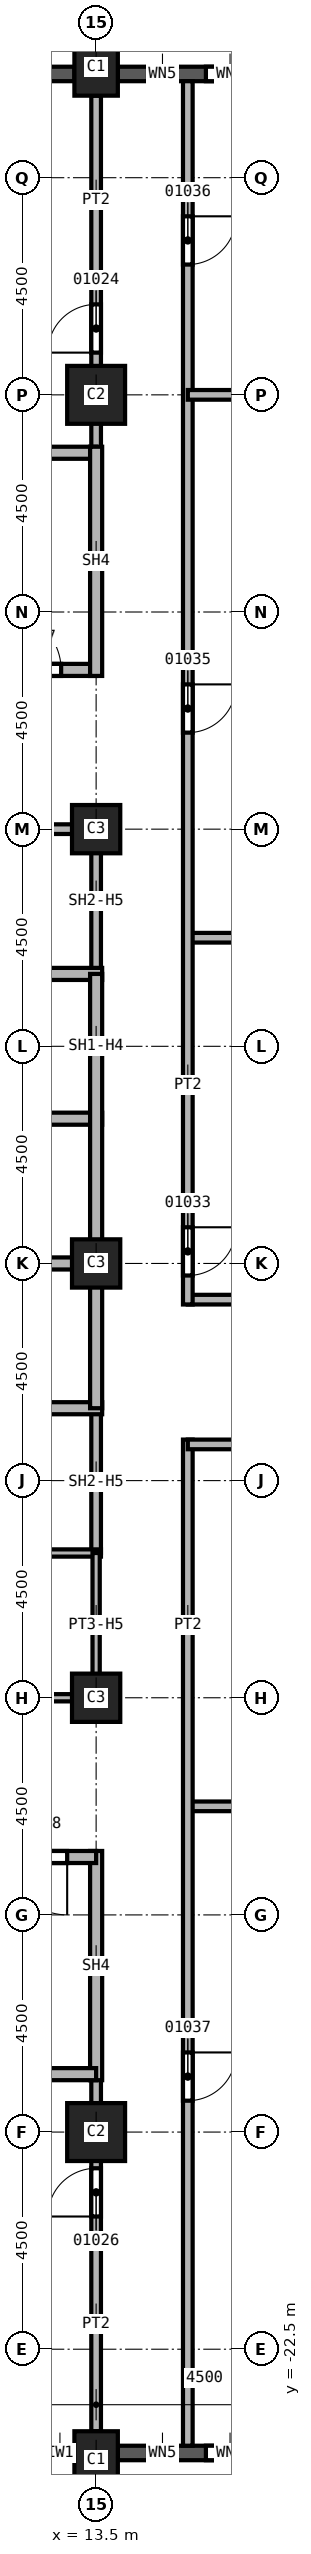
"""IFC4 building model, lengths in metres.
Left out: names, types, materials, properties, quantities, classifications, styles, units other than length and angle.
Written with IfcOpenShell. Run it as: python <this file> out.ifc"""

import sys

from ifc_helpers import new_model, si_unit, direction, frame, frame_2d, origin, origin_2d, place, context, subcontext, project, spatial, rectangle, extrude, element, fill, save


model = new_model("IFC4")
c1 = context("Model", 3, precision=1e-05, world=origin(), true_north=direction((0.0, 1.0)))
c2 = subcontext(c1, "Body", "Model", "MODEL_VIEW")
j1 = project(units=[si_unit("LENGTHUNIT", "METRE"), si_unit("PLANEANGLEUNIT", "RADIAN")], contexts=[c1])
p1 = place(None, origin())
s1 = spatial("IfcSite", under=j1, at=p1, CompositionType="ELEMENT")
p2 = place(p1, origin())
s2 = spatial("IfcBuilding", under=s1, at=p2, CompositionType="ELEMENT")
p3 = place(p2, frame((0.0, 0.0, 72.0)))
s3 = spatial("IfcBuildingStorey", under=s2, at=p3, CompositionType="ELEMENT", Elevation=72.0)
for number, where, z_axis, x_axis in (
    (1, (13.5, 18.0, 0.0), (0.0, 0.0, 1.0), (1.0, 0.0, 0.0)),
    (2, (13.5, -18.0, 0.0), (0.0, 0.0, 1.0), (1.0, 0.0, 0.0)),
):
    element("IfcColumn", number, at=place(p3, frame(where, z_axis=z_axis, x_axis=x_axis)), inside=s3, PredefinedType="COLUMN", context=c2, shape_type="SweptSolid", body=[
        extrude(rectangle(XDim=1.2, YDim=1.2, at=origin_2d()), origin(), (0.0, 0.0, 1.0), 3.7),
    ])
for number, where, z_axis, x_axis in (
    (3, (13.5, 0.0, 0.0), (0.0, 0.0, 1.0), (1.0, 0.0, 0.0)),
    (4, (13.5, 9.0, 0.0), (0.0, 0.0, 1.0), (1.0, 0.0, 0.0)),
    (5, (13.5, -9.0, 0.0), (0.0, 0.0, 1.0), (1.0, 0.0, 0.0)),
):
    element("IfcColumn", number, at=place(p3, frame(where, z_axis=z_axis, x_axis=x_axis)), inside=s3, PredefinedType="COLUMN", context=c2, shape_type="SweptSolid", body=[
        extrude(rectangle(XDim=1.0, YDim=1.0, at=origin_2d()), origin(), (0.0, 0.0, 1.0), 3.7),
    ])
for number, where, z_axis, x_axis in (
    (6, (13.5, 24.8, 0.0), (0.0, 0.0, 1.0), (1.0, 0.0, 0.0)),
    (7, (13.5, -24.8, 0.0), (0.0, 0.0, 1.0), (1.0, 0.0, 0.0)),
):
    element("IfcColumn", number, at=place(p3, frame(where, z_axis=z_axis, x_axis=x_axis)), inside=s3, PredefinedType="COLUMN", context=c2, shape_type="SweptSolid", body=[
        extrude(rectangle(XDim=0.9, YDim=1.2, at=origin_2d()), origin(), (0.0, 0.0, 1.0), 3.7),
    ])
p4 = place(p3, frame((9.45, -24.65, 0.0), z_axis=(0.0, 0.0, 1.0), x_axis=(1.0, 0.0, 0.0)))
e8 = element("IfcWall", 8, at=p4, inside=s3, PredefinedType="SOLIDWALL", context=c2, shape_type="SweptSolid", body=[
    extrude(rectangle(XDim=3.6, YDim=0.3, at=frame_2d((1.8, 0.0))), origin(), (0.0, 0.0, 1.0), 3.1),
])
p5 = place(p4, frame((0.6, 0.0, 0.8)))
e9 = element("IfcOpeningElement", 9, at=p5, cuts=e8, PredefinedType="OPENING", context=c2, shape_type="SweptSolid", body=[
    extrude(rectangle(XDim=2.4, YDim=1.95, at=frame_2d((1.2, 0.975))), frame((0.0, 0.15, 0.0), z_axis=(0.0, -1.0, 0.0), x_axis=(1.0, 0.0, 0.0)), (0.0, 0.0, 1.0), 0.3),
])
p6 = place(p3, frame((13.95, -24.65, 0.0), z_axis=(0.0, 0.0, 1.0), x_axis=(1.0, 0.0, 0.0)))
e10 = element("IfcWall", 10, at=p6, inside=s3, PredefinedType="SOLIDWALL", context=c2, shape_type="SweptSolid", body=[
    extrude(rectangle(XDim=3.6, YDim=0.3, at=frame_2d((1.8, 0.0))), origin(), (0.0, 0.0, 1.0), 3.1),
])
p7 = place(p6, frame((0.625, 0.0, 0.8)))
e11 = element("IfcOpeningElement", 11, at=p7, cuts=e10, PredefinedType="OPENING", context=c2, shape_type="SweptSolid", body=[
    extrude(rectangle(XDim=0.6, YDim=1.95, at=frame_2d((0.3, 0.975))), frame((0.0, 0.15, 0.0), z_axis=(0.0, -1.0, 0.0), x_axis=(1.0, 0.0, 0.0)), (0.0, 0.0, 1.0), 0.3),
])
p8 = place(p6, frame((1.825, 0.0, 0.8)))
e12 = element("IfcOpeningElement", 12, at=p8, cuts=e10, PredefinedType="OPENING", context=c2, shape_type="SweptSolid", body=[
    extrude(rectangle(XDim=1.0, YDim=1.95, at=frame_2d((0.5, 0.975))), frame((0.0, 0.15, 0.0), z_axis=(0.0, -1.0, 0.0), x_axis=(1.0, 0.0, 0.0)), (0.0, 0.0, 1.0), 0.3),
])
p9 = place(p3, frame((17.55, 24.65, 0.0), z_axis=(0.0, 0.0, 1.0), x_axis=(-1.0, 0.0, 0.0)))
e13 = element("IfcWall", 13, at=p9, inside=s3, PredefinedType="SOLIDWALL", context=c2, shape_type="SweptSolid", body=[
    extrude(rectangle(XDim=3.6, YDim=0.3, at=frame_2d((1.8, 0.0))), origin(), (0.0, 0.0, 1.0), 3.1),
])
p10 = place(p9, frame((0.775, 0.0, 0.8)))
e14 = element("IfcOpeningElement", 14, at=p10, cuts=e13, PredefinedType="OPENING", context=c2, shape_type="SweptSolid", body=[
    extrude(rectangle(XDim=1.0, YDim=1.95, at=frame_2d((0.5, 0.975))), frame((0.0, 0.15, 0.0), z_axis=(0.0, -1.0, 0.0), x_axis=(1.0, 0.0, 0.0)), (0.0, 0.0, 1.0), 0.3),
])
p11 = place(p9, frame((2.375, 0.0, 0.8)))
e15 = element("IfcOpeningElement", 15, at=p11, cuts=e13, PredefinedType="OPENING", context=c2, shape_type="SweptSolid", body=[
    extrude(rectangle(XDim=0.6, YDim=1.95, at=frame_2d((0.3, 0.975))), frame((0.0, 0.15, 0.0), z_axis=(0.0, -1.0, 0.0), x_axis=(1.0, 0.0, 0.0)), (0.0, 0.0, 1.0), 0.3),
])
p12 = place(p3, frame((13.05, 24.65, 0.0), z_axis=(0.0, 0.0, 1.0), x_axis=(-1.0, 0.0, 0.0)))
e16 = element("IfcWall", 16, at=p12, inside=s3, PredefinedType="SOLIDWALL", context=c2, shape_type="SweptSolid", body=[
    extrude(rectangle(XDim=3.6, YDim=0.3, at=frame_2d((1.8, 0.0))), origin(), (0.0, 0.0, 1.0), 3.1),
])
p13 = place(p12, frame((0.6, 0.0, 0.8)))
e17 = element("IfcOpeningElement", 17, at=p13, cuts=e16, PredefinedType="OPENING", context=c2, shape_type="SweptSolid", body=[
    extrude(rectangle(XDim=2.4, YDim=1.95, at=frame_2d((1.2, 0.975))), frame((0.0, 0.15, 0.0), z_axis=(0.0, -1.0, 0.0), x_axis=(1.0, 0.0, 0.0)), (0.0, 0.0, 1.0), 0.3),
])
p14 = place(p3, frame((13.5, -24.2, 0.0), z_axis=(0.0, 0.0, 1.0), x_axis=(0.0, 1.0, 0.0)))
e18 = element("IfcWall", 18, at=p14, inside=s3, PredefinedType="PARTITIONING", context=c2, shape_type="SweptSolid", body=[
    extrude(rectangle(XDim=7.525, YDim=0.2, at=frame_2d((3.762, 0.0))), origin(), (0.0, 0.0, 1.0), 3.7),
])
p15 = place(p14, frame((4.45, 0.0, 0.0)))
e19 = element("IfcOpeningElement", 19, at=p15, cuts=e18, PredefinedType="OPENING", context=c2, shape_type="SweptSolid", body=[
    extrude(rectangle(XDim=1.0, YDim=2.1, at=frame_2d((0.5, 1.05))), frame((0.0, 0.1, 0.0), z_axis=(0.0, -1.0, 0.0), x_axis=(1.0, 0.0, 0.0)), (0.0, 0.0, 1.0), 0.2),
])
p16 = place(p3, frame((13.5, 16.675, 0.0), z_axis=(0.0, 0.0, 1.0), x_axis=(0.0, 1.0, 0.0)))
e20 = element("IfcWall", 20, at=p16, inside=s3, PredefinedType="PARTITIONING", context=c2, shape_type="SweptSolid", body=[
    extrude(rectangle(XDim=7.525, YDim=0.2, at=frame_2d((3.762, 0.0))), origin(), (0.0, 0.0, 1.0), 3.7),
])
p17 = place(p16, frame((2.2, 0.0, 0.0)))
e21 = element("IfcOpeningElement", 21, at=p17, cuts=e20, PredefinedType="OPENING", context=c2, shape_type="SweptSolid", body=[
    extrude(rectangle(XDim=1.0, YDim=2.1, at=frame_2d((0.5, 1.05))), frame((0.0, 0.1, 0.0), z_axis=(0.0, -1.0, 0.0), x_axis=(1.0, 0.0, 0.0)), (0.0, 0.0, 1.0), 0.2),
])
p18 = place(p3, frame((15.4, -11.25, 0.0), z_axis=(0.0, 0.0, 1.0), x_axis=(1.0, 0.0, 0.0)))
e22 = element("IfcWall", 22, at=p18, inside=s3, PredefinedType="PARTITIONING", context=c2, shape_type="SweptSolid", body=[
    extrude(rectangle(XDim=11.7, YDim=0.2, at=frame_2d((5.85, 0.0))), origin(), (0.0, 0.0, 1.0), 3.7),
])
p19 = place(p3, frame((15.4, -3.65, 0.0), z_axis=(0.0, 0.0, 1.0), x_axis=(0.0, -1.0, 0.0)))
e23 = element("IfcWall", 23, at=p19, inside=s3, PredefinedType="PARTITIONING", context=c2, shape_type="SweptSolid", body=[
    extrude(rectangle(XDim=20.85, YDim=0.2, at=frame_2d((10.425, 0.0))), origin(), (0.0, 0.0, 1.0), 3.7),
])
p20 = place(p19, frame((12.7, 0.0, 0.0)))
e24 = element("IfcOpeningElement", 24, at=p20, cuts=e23, PredefinedType="OPENING", context=c2, shape_type="SweptSolid", body=[
    extrude(rectangle(XDim=1.0, YDim=2.1, at=frame_2d((0.5, 1.05))), frame((0.0, 0.1, 0.0), z_axis=(0.0, -1.0, 0.0), x_axis=(1.0, 0.0, 0.0)), (0.0, 0.0, 1.0), 0.2),
])
p21 = place(p3, frame((15.4, -0.75, 0.0), z_axis=(0.0, 0.0, 1.0), x_axis=(1.0, 0.0, 0.0)))
e25 = element("IfcWall", 25, at=p21, inside=s3, PredefinedType="PARTITIONING", context=c2, shape_type="SweptSolid", body=[
    extrude(rectangle(XDim=18.45, YDim=0.2, at=frame_2d((9.225, 0.0))), origin(), (0.0, 0.0, 1.0), 3.7),
])
p22 = place(p3, frame((15.4, 6.75, 0.0), z_axis=(0.0, 0.0, 1.0), x_axis=(1.0, 0.0, 0.0)))
e26 = element("IfcWall", 26, at=p22, inside=s3, PredefinedType="PARTITIONING", context=c2, shape_type="SweptSolid", body=[
    extrude(rectangle(XDim=11.7, YDim=0.2, at=frame_2d((5.85, 0.0))), origin(), (0.0, 0.0, 1.0), 3.7),
])
p23 = place(p3, frame((15.4, 24.5, 0.0), z_axis=(0.0, 0.0, 1.0), x_axis=(0.0, -1.0, 0.0)))
e27 = element("IfcWall", 27, at=p23, inside=s3, PredefinedType="PARTITIONING", context=c2, shape_type="SweptSolid", body=[
    extrude(rectangle(XDim=25.35, YDim=0.2, at=frame_2d((12.675, 0.0))), origin(), (0.0, 0.0, 1.0), 3.7),
])
p24 = place(p23, frame((23.75, 0.0, 0.0)))
e28 = element("IfcOpeningElement", 28, at=p24, cuts=e27, PredefinedType="OPENING", context=c2, shape_type="SweptSolid", body=[
    extrude(rectangle(XDim=1.0, YDim=2.1, at=frame_2d((0.5, 1.05))), frame((0.0, 0.1, 0.0), z_axis=(0.0, -1.0, 0.0), x_axis=(1.0, 0.0, 0.0)), (0.0, 0.0, 1.0), 0.2),
])
p25 = place(p23, frame((12.5, 0.0, 0.0)))
e29 = element("IfcOpeningElement", 29, at=p25, cuts=e27, PredefinedType="OPENING", context=c2, shape_type="SweptSolid", body=[
    extrude(rectangle(XDim=1.0, YDim=2.1, at=frame_2d((0.5, 1.05))), frame((0.0, 0.1, 0.0), z_axis=(0.0, -1.0, 0.0), x_axis=(1.0, 0.0, 0.0)), (0.0, 0.0, 1.0), 0.2),
])
p26 = place(p23, frame((2.8, 0.0, 0.0)))
e30 = element("IfcOpeningElement", 30, at=p26, cuts=e27, PredefinedType="OPENING", context=c2, shape_type="SweptSolid", body=[
    extrude(rectangle(XDim=1.0, YDim=2.1, at=frame_2d((0.5, 1.05))), frame((0.0, 0.1, 0.0), z_axis=(0.0, -1.0, 0.0), x_axis=(1.0, 0.0, 0.0)), (0.0, 0.0, 1.0), 0.2),
])
p27 = place(p3, frame((15.4, 18.0, 0.0), z_axis=(0.0, 0.0, 1.0), x_axis=(1.0, 0.0, 0.0)))
e31 = element("IfcWall", 31, at=p27, inside=s3, PredefinedType="PARTITIONING", context=c2, shape_type="SweptSolid", body=[
    extrude(rectangle(XDim=8.75, YDim=0.2, at=frame_2d((4.375, 0.0))), origin(), (0.0, 0.0, 1.0), 3.7),
])
p28 = place(p3, frame((33.85, -3.75, 0.0), z_axis=(0.0, 0.0, 1.0), x_axis=(-1.0, 0.0, 0.0)))
e32 = element("IfcWall", 32, at=p28, inside=s3, PredefinedType="PARTITIONING", context=c2, shape_type="SweptSolid", body=[
    extrude(rectangle(XDim=18.45, YDim=0.2, at=frame_2d((9.225, 0.0))), origin(), (0.0, 0.0, 1.0), 3.7),
])
p29 = place(p28, frame((9.4, 0.0, 0.0)))
e33 = element("IfcOpeningElement", 33, at=p29, cuts=e32, PredefinedType="OPENING", context=c2, shape_type="SweptSolid", body=[
    extrude(rectangle(XDim=1.0, YDim=2.1, at=frame_2d((0.5, 1.05))), frame((0.0, 0.1, 0.0), z_axis=(0.0, -1.0, 0.0), x_axis=(1.0, 0.0, 0.0)), (0.0, 0.0, 1.0), 0.2),
])
for number, where, z_axis, x_axis in (
    (34, (10.5, 9.0, 0.0), (0.0, 0.0, 1.0), (1.0, 0.0, 0.0)),
    (35, (13.5, -3.0, 0.0), (0.0, 0.0, 1.0), (0.0, -1.0, 0.0)),
):
    element("IfcWall", number, at=place(p3, frame(where, z_axis=z_axis, x_axis=x_axis)), inside=s3, PredefinedType="SOLIDWALL", context=c2, shape_type="SweptSolid", body=[
        extrude(rectangle(XDim=3.0, YDim=0.2, at=frame_2d((1.5, 0.0))), origin(), (0.0, 0.0, 1.0), 2.938),
    ])
p30 = place(p3, frame((13.5, 9.1, 0.0), z_axis=(0.0, 0.0, 1.0), x_axis=(0.0, -1.0, 0.0)))
e36 = element("IfcWall", 36, at=p30, inside=s3, PredefinedType="SOLIDWALL", context=c2, shape_type="SweptSolid", body=[
    extrude(rectangle(XDim=3.1, YDim=0.2, at=frame_2d((1.55, 0.0))), origin(), (0.0, 0.0, 1.0), 2.938),
])
p31 = place(p3, frame((4.375, 3.0, 0.0), z_axis=(0.0, 0.0, 1.0), x_axis=(1.0, 0.0, 0.0)))
e37 = element("IfcWall", 37, at=p31, inside=s3, PredefinedType="SOLIDWALL", context=c2, shape_type="SweptSolid", body=[
    extrude(rectangle(XDim=9.25, YDim=0.25, at=frame_2d((4.625, 0.0))), origin(), (0.0, 0.0, 1.0), 3.7),
])
p32 = place(p31, frame((3.375, 0.0, 0.0)))
e38 = element("IfcOpeningElement", 38, at=p32, cuts=e37, PredefinedType="OPENING", context=c2, shape_type="SweptSolid", body=[
    extrude(rectangle(XDim=1.1, YDim=2.1, at=frame_2d((0.55, 1.05))), frame((0.0, 0.125, 0.0), z_axis=(0.0, -1.0, 0.0), x_axis=(1.0, 0.0, 0.0)), (0.0, 0.0, 1.0), 0.25),
])
p33 = place(p3, frame((7.5, -3.0, 0.0), z_axis=(0.0, 0.0, 1.0), x_axis=(1.0, 0.0, 0.0)))
e39 = element("IfcWall", 39, at=p33, inside=s3, PredefinedType="SOLIDWALL", context=c2, shape_type="SweptSolid", body=[
    extrude(rectangle(XDim=6.125, YDim=0.25, at=frame_2d((3.062, 0.0))), origin(), (0.0, 0.0, 1.0), 3.7),
])
p34 = place(p33, frame((0.25, 0.0, 0.0)))
e40 = element("IfcOpeningElement", 40, at=p34, cuts=e39, PredefinedType="OPENING", context=c2, shape_type="SweptSolid", body=[
    extrude(rectangle(XDim=1.1, YDim=2.1, at=frame_2d((0.55, 1.05))), frame((0.0, 0.125, 0.0), z_axis=(0.0, -1.0, 0.0), x_axis=(1.0, 0.0, 0.0)), (0.0, 0.0, 1.0), 0.25),
])
for number, where, z_axis, x_axis in (
    (41, (10.5, 0.0, 0.0), (0.0, 0.0, 1.0), (1.0, 0.0, 0.0)),
    (42, (10.5, 6.0, 0.0), (0.0, 0.0, 1.0), (1.0, 0.0, 0.0)),
):
    element("IfcWall", number, at=place(p3, frame(where, z_axis=z_axis, x_axis=x_axis)), inside=s3, PredefinedType="SOLIDWALL", context=c2, shape_type="SweptSolid", body=[
        extrude(rectangle(XDim=3.125, YDim=0.25, at=frame_2d((1.562, 0.0))), origin(), (0.0, 0.0, 1.0), 3.7),
    ])
p35 = place(p3, frame((13.5, 6.0, 0.0), z_axis=(0.0, 0.0, 1.0), x_axis=(0.0, -1.0, 0.0)))
e43 = element("IfcWall", 43, at=p35, inside=s3, PredefinedType="SOLIDWALL", context=c2, shape_type="SweptSolid", body=[
    extrude(rectangle(XDim=9.0, YDim=0.25, at=frame_2d((4.5, 0.0))), origin(), (0.0, 0.0, 1.0), 2.938),
])
p36 = place(p3, frame((4.375, 12.3, 0.0), z_axis=(0.0, 0.0, 1.0), x_axis=(1.0, 0.0, 0.0)))
e44 = element("IfcWall", 44, at=p36, inside=s3, PredefinedType="SOLIDWALL", context=c2, shape_type="SweptSolid", body=[
    extrude(rectangle(XDim=9.125, YDim=0.25, at=frame_2d((4.562, 0.0))), origin(), (0.0, 0.0, 1.0), 3.7),
])
p37 = place(p36, frame((7.2, 0.0, 0.0)))
e45 = element("IfcOpeningElement", 45, at=p37, cuts=e44, PredefinedType="OPENING", context=c2, shape_type="SweptSolid", body=[
    extrude(rectangle(XDim=1.2, YDim=2.1, at=frame_2d((0.6, 1.05))), frame((0.0, 0.125, 0.0), z_axis=(0.0, -1.0, 0.0), x_axis=(1.0, 0.0, 0.0)), (0.0, 0.0, 1.0), 0.25),
])
p38 = place(p3, frame((4.375, 16.8, 0.0), z_axis=(0.0, 0.0, 1.0), x_axis=(1.0, 0.0, 0.0)))
e46 = element("IfcWall", 46, at=p38, inside=s3, PredefinedType="SOLIDWALL", context=c2, shape_type="SweptSolid", body=[
    extrude(rectangle(XDim=9.125, YDim=0.25, at=frame_2d((4.562, 0.0))), origin(), (0.0, 0.0, 1.0), 3.7),
])
p39 = place(p3, frame((13.5, -16.925, 0.0), z_axis=(0.0, 0.0, 1.0), x_axis=(0.0, 1.0, 0.0)))
e47 = element("IfcWall", 47, at=p39, inside=s3, PredefinedType="SOLIDWALL", context=c2, shape_type="SweptSolid", body=[
    extrude(rectangle(XDim=4.75, YDim=0.25, at=frame_2d((2.375, 0.0))), origin(), (0.0, 0.0, 1.0), 3.7),
])
p40 = place(p3, frame((13.5, -16.8, 0.0), z_axis=(0.0, 0.0, 1.0), x_axis=(-1.0, 0.0, 0.0)))
e48 = element("IfcWall", 48, at=p40, inside=s3, PredefinedType="SOLIDWALL", context=c2, shape_type="SweptSolid", body=[
    extrude(rectangle(XDim=9.125, YDim=0.25, at=frame_2d((4.562, 0.0))), origin(), (0.0, 0.0, 1.0), 3.7),
])
p41 = place(p3, frame((13.5, -12.3, 0.0), z_axis=(0.0, 0.0, 1.0), x_axis=(-1.0, 0.0, 0.0)))
e49 = element("IfcWall", 49, at=p41, inside=s3, PredefinedType="SOLIDWALL", context=c2, shape_type="SweptSolid", body=[
    extrude(rectangle(XDim=9.125, YDim=0.25, at=frame_2d((4.562, 0.0))), origin(), (0.0, 0.0, 1.0), 3.7),
])
p42 = place(p41, frame((0.6, 0.0, 0.0)))
e50 = element("IfcOpeningElement", 50, at=p42, cuts=e49, PredefinedType="OPENING", context=c2, shape_type="SweptSolid", body=[
    extrude(rectangle(XDim=1.2, YDim=2.1, at=frame_2d((0.6, 1.05))), frame((0.0, 0.125, 0.0), z_axis=(0.0, -1.0, 0.0), x_axis=(1.0, 0.0, 0.0)), (0.0, 0.0, 1.0), 0.25),
])
p43 = place(p3, frame((13.5, 12.175, 0.0), z_axis=(0.0, 0.0, 1.0), x_axis=(0.0, 1.0, 0.0)))
e51 = element("IfcWall", 51, at=p43, inside=s3, PredefinedType="SOLIDWALL", context=c2, shape_type="SweptSolid", body=[
    extrude(rectangle(XDim=4.75, YDim=0.25, at=frame_2d((2.375, 0.0))), origin(), (0.0, 0.0, 1.0), 3.7),
])
p44 = place(p3, frame((10.5, -6.0, 0.0), z_axis=(0.0, 0.0, 1.0), x_axis=(1.0, 0.0, 0.0)))
e52 = element("IfcWall", 52, at=p44, inside=s3, PredefinedType="PARTITIONING", context=c2, shape_type="SweptSolid", body=[
    extrude(rectangle(XDim=3.1, YDim=0.15, at=frame_2d((1.55, 0.0))), origin(), (0.0, 0.0, 1.0), 3.7),
])
p45 = place(p3, frame((13.5, -9.0, 0.0), z_axis=(0.0, 0.0, 1.0), x_axis=(-1.0, 0.0, 0.0)))
e53 = element("IfcWall", 53, at=p45, inside=s3, PredefinedType="PARTITIONING", context=c2, shape_type="SweptSolid", body=[
    extrude(rectangle(XDim=3.0, YDim=0.15, at=frame_2d((1.5, 0.0))), origin(), (0.0, 0.0, 1.0), 2.938),
])
p46 = place(p3, frame((13.5, -6.0, 0.0), z_axis=(0.0, 0.0, 1.0), x_axis=(0.0, -1.0, 0.0)))
e54 = element("IfcWall", 54, at=p46, inside=s3, PredefinedType="PARTITIONING", context=c2, shape_type="SweptSolid", body=[
    extrude(rectangle(XDim=3.075, YDim=0.15, at=frame_2d((1.538, 0.0))), origin(), (0.0, 0.0, 1.0), 2.938),
])
p47 = place(p37, origin())
e55 = element("IfcDoor", 55, at=p47, inside=s3, OperationType="SINGLE_SWING_RIGHT", PredefinedType="DOOR", context=c2, shape_type="SweptSolid", body=[
    extrude(rectangle(XDim=1.2, YDim=2.1, at=frame_2d((0.6, 1.05))), frame((0.0, 0.025, 0.0), z_axis=(0.0, -1.0, 0.0), x_axis=(1.0, 0.0, 0.0)), (0.0, 0.0, 1.0), 0.05),
])
fill(e45, e55)
p48 = place(p42, origin())
e56 = element("IfcDoor", 56, at=p48, inside=s3, OperationType="SINGLE_SWING_LEFT", PredefinedType="DOOR", context=c2, shape_type="SweptSolid", body=[
    extrude(rectangle(XDim=1.2, YDim=2.1, at=frame_2d((0.6, 1.05))), frame((0.0, 0.025, 0.0), z_axis=(0.0, -1.0, 0.0), x_axis=(1.0, 0.0, 0.0)), (0.0, 0.0, 1.0), 0.05),
])
fill(e50, e56)
p49 = place(p17, origin())
e57 = element("IfcDoor", 57, at=p49, inside=s3, OperationType="SINGLE_SWING_LEFT", PredefinedType="DOOR", context=c2, shape_type="SweptSolid", body=[
    extrude(rectangle(XDim=1.0, YDim=2.1, at=frame_2d((0.5, 1.05))), frame((0.0, 0.025, 0.0), z_axis=(0.0, -1.0, 0.0), x_axis=(1.0, 0.0, 0.0)), (0.0, 0.0, 1.0), 0.05),
])
fill(e21, e57)
p50 = place(p15, origin())
e58 = element("IfcDoor", 58, at=p50, inside=s3, OperationType="SINGLE_SWING_LEFT", PredefinedType="DOOR", context=c2, shape_type="SweptSolid", body=[
    extrude(rectangle(XDim=1.0, YDim=2.1, at=frame_2d((0.5, 1.05))), frame((0.0, 0.025, 0.0), z_axis=(0.0, -1.0, 0.0), x_axis=(1.0, 0.0, 0.0)), (0.0, 0.0, 1.0), 0.05),
])
fill(e19, e58)
p51 = place(p24, origin())
e59 = element("IfcDoor", 59, at=p51, inside=s3, OperationType="SINGLE_SWING_RIGHT", PredefinedType="DOOR", context=c2, shape_type="SweptSolid", body=[
    extrude(rectangle(XDim=1.0, YDim=2.1, at=frame_2d((0.5, 1.05))), frame((0.0, 0.025, 0.0), z_axis=(0.0, -1.0, 0.0), x_axis=(1.0, 0.0, 0.0)), (0.0, 0.0, 1.0), 0.05),
])
fill(e28, e59)
p52 = place(p25, origin())
e60 = element("IfcDoor", 60, at=p52, inside=s3, OperationType="SINGLE_SWING_RIGHT", PredefinedType="DOOR", context=c2, shape_type="SweptSolid", body=[
    extrude(rectangle(XDim=1.0, YDim=2.1, at=frame_2d((0.5, 1.05))), frame((0.0, 0.025, 0.0), z_axis=(0.0, -1.0, 0.0), x_axis=(1.0, 0.0, 0.0)), (0.0, 0.0, 1.0), 0.05),
])
fill(e29, e60)
p53 = place(p26, origin())
e61 = element("IfcDoor", 61, at=p53, inside=s3, OperationType="SINGLE_SWING_LEFT", PredefinedType="DOOR", context=c2, shape_type="SweptSolid", body=[
    extrude(rectangle(XDim=1.0, YDim=2.1, at=frame_2d((0.5, 1.05))), frame((0.0, 0.025, 0.0), z_axis=(0.0, -1.0, 0.0), x_axis=(1.0, 0.0, 0.0)), (0.0, 0.0, 1.0), 0.05),
])
fill(e30, e61)
p54 = place(p20, origin())
e62 = element("IfcDoor", 62, at=p54, inside=s3, OperationType="SINGLE_SWING_RIGHT", PredefinedType="DOOR", context=c2, shape_type="SweptSolid", body=[
    extrude(rectangle(XDim=1.0, YDim=2.1, at=frame_2d((0.5, 1.05))), frame((0.0, 0.025, 0.0), z_axis=(0.0, -1.0, 0.0), x_axis=(1.0, 0.0, 0.0)), (0.0, 0.0, 1.0), 0.05),
])
fill(e24, e62)
p55 = place(p7, origin())
e63 = element("IfcWindow", 63, at=p55, inside=s3, PartitioningType="SINGLE_PANEL", PredefinedType="WINDOW", context=c2, shape_type="SweptSolid", body=[
    extrude(rectangle(XDim=0.6, YDim=1.95, at=frame_2d((0.3, 0.975))), frame((0.0, 0.03, 0.0), z_axis=(0.0, -1.0, 0.0), x_axis=(1.0, 0.0, 0.0)), (0.0, 0.0, 1.0), 0.06),
])
fill(e11, e63)
p56 = place(p8, origin())
e64 = element("IfcWindow", 64, at=p56, inside=s3, PartitioningType="SINGLE_PANEL", PredefinedType="WINDOW", context=c2, shape_type="SweptSolid", body=[
    extrude(rectangle(XDim=1.0, YDim=1.95, at=frame_2d((0.5, 0.975))), frame((0.0, 0.03, 0.0), z_axis=(0.0, -1.0, 0.0), x_axis=(1.0, 0.0, 0.0)), (0.0, 0.0, 1.0), 0.06),
])
fill(e12, e64)
p57 = place(p10, origin())
e65 = element("IfcWindow", 65, at=p57, inside=s3, PartitioningType="SINGLE_PANEL", PredefinedType="WINDOW", context=c2, shape_type="SweptSolid", body=[
    extrude(rectangle(XDim=1.0, YDim=1.95, at=frame_2d((0.5, 0.975))), frame((0.0, 0.03, 0.0), z_axis=(0.0, -1.0, 0.0), x_axis=(1.0, 0.0, 0.0)), (0.0, 0.0, 1.0), 0.06),
])
fill(e14, e65)
p58 = place(p11, origin())
e66 = element("IfcWindow", 66, at=p58, inside=s3, PartitioningType="SINGLE_PANEL", PredefinedType="WINDOW", context=c2, shape_type="SweptSolid", body=[
    extrude(rectangle(XDim=0.6, YDim=1.95, at=frame_2d((0.3, 0.975))), frame((0.0, 0.03, 0.0), z_axis=(0.0, -1.0, 0.0), x_axis=(1.0, 0.0, 0.0)), (0.0, 0.0, 1.0), 0.06),
])
fill(e15, e66)
save(model, sys.argv[1])
